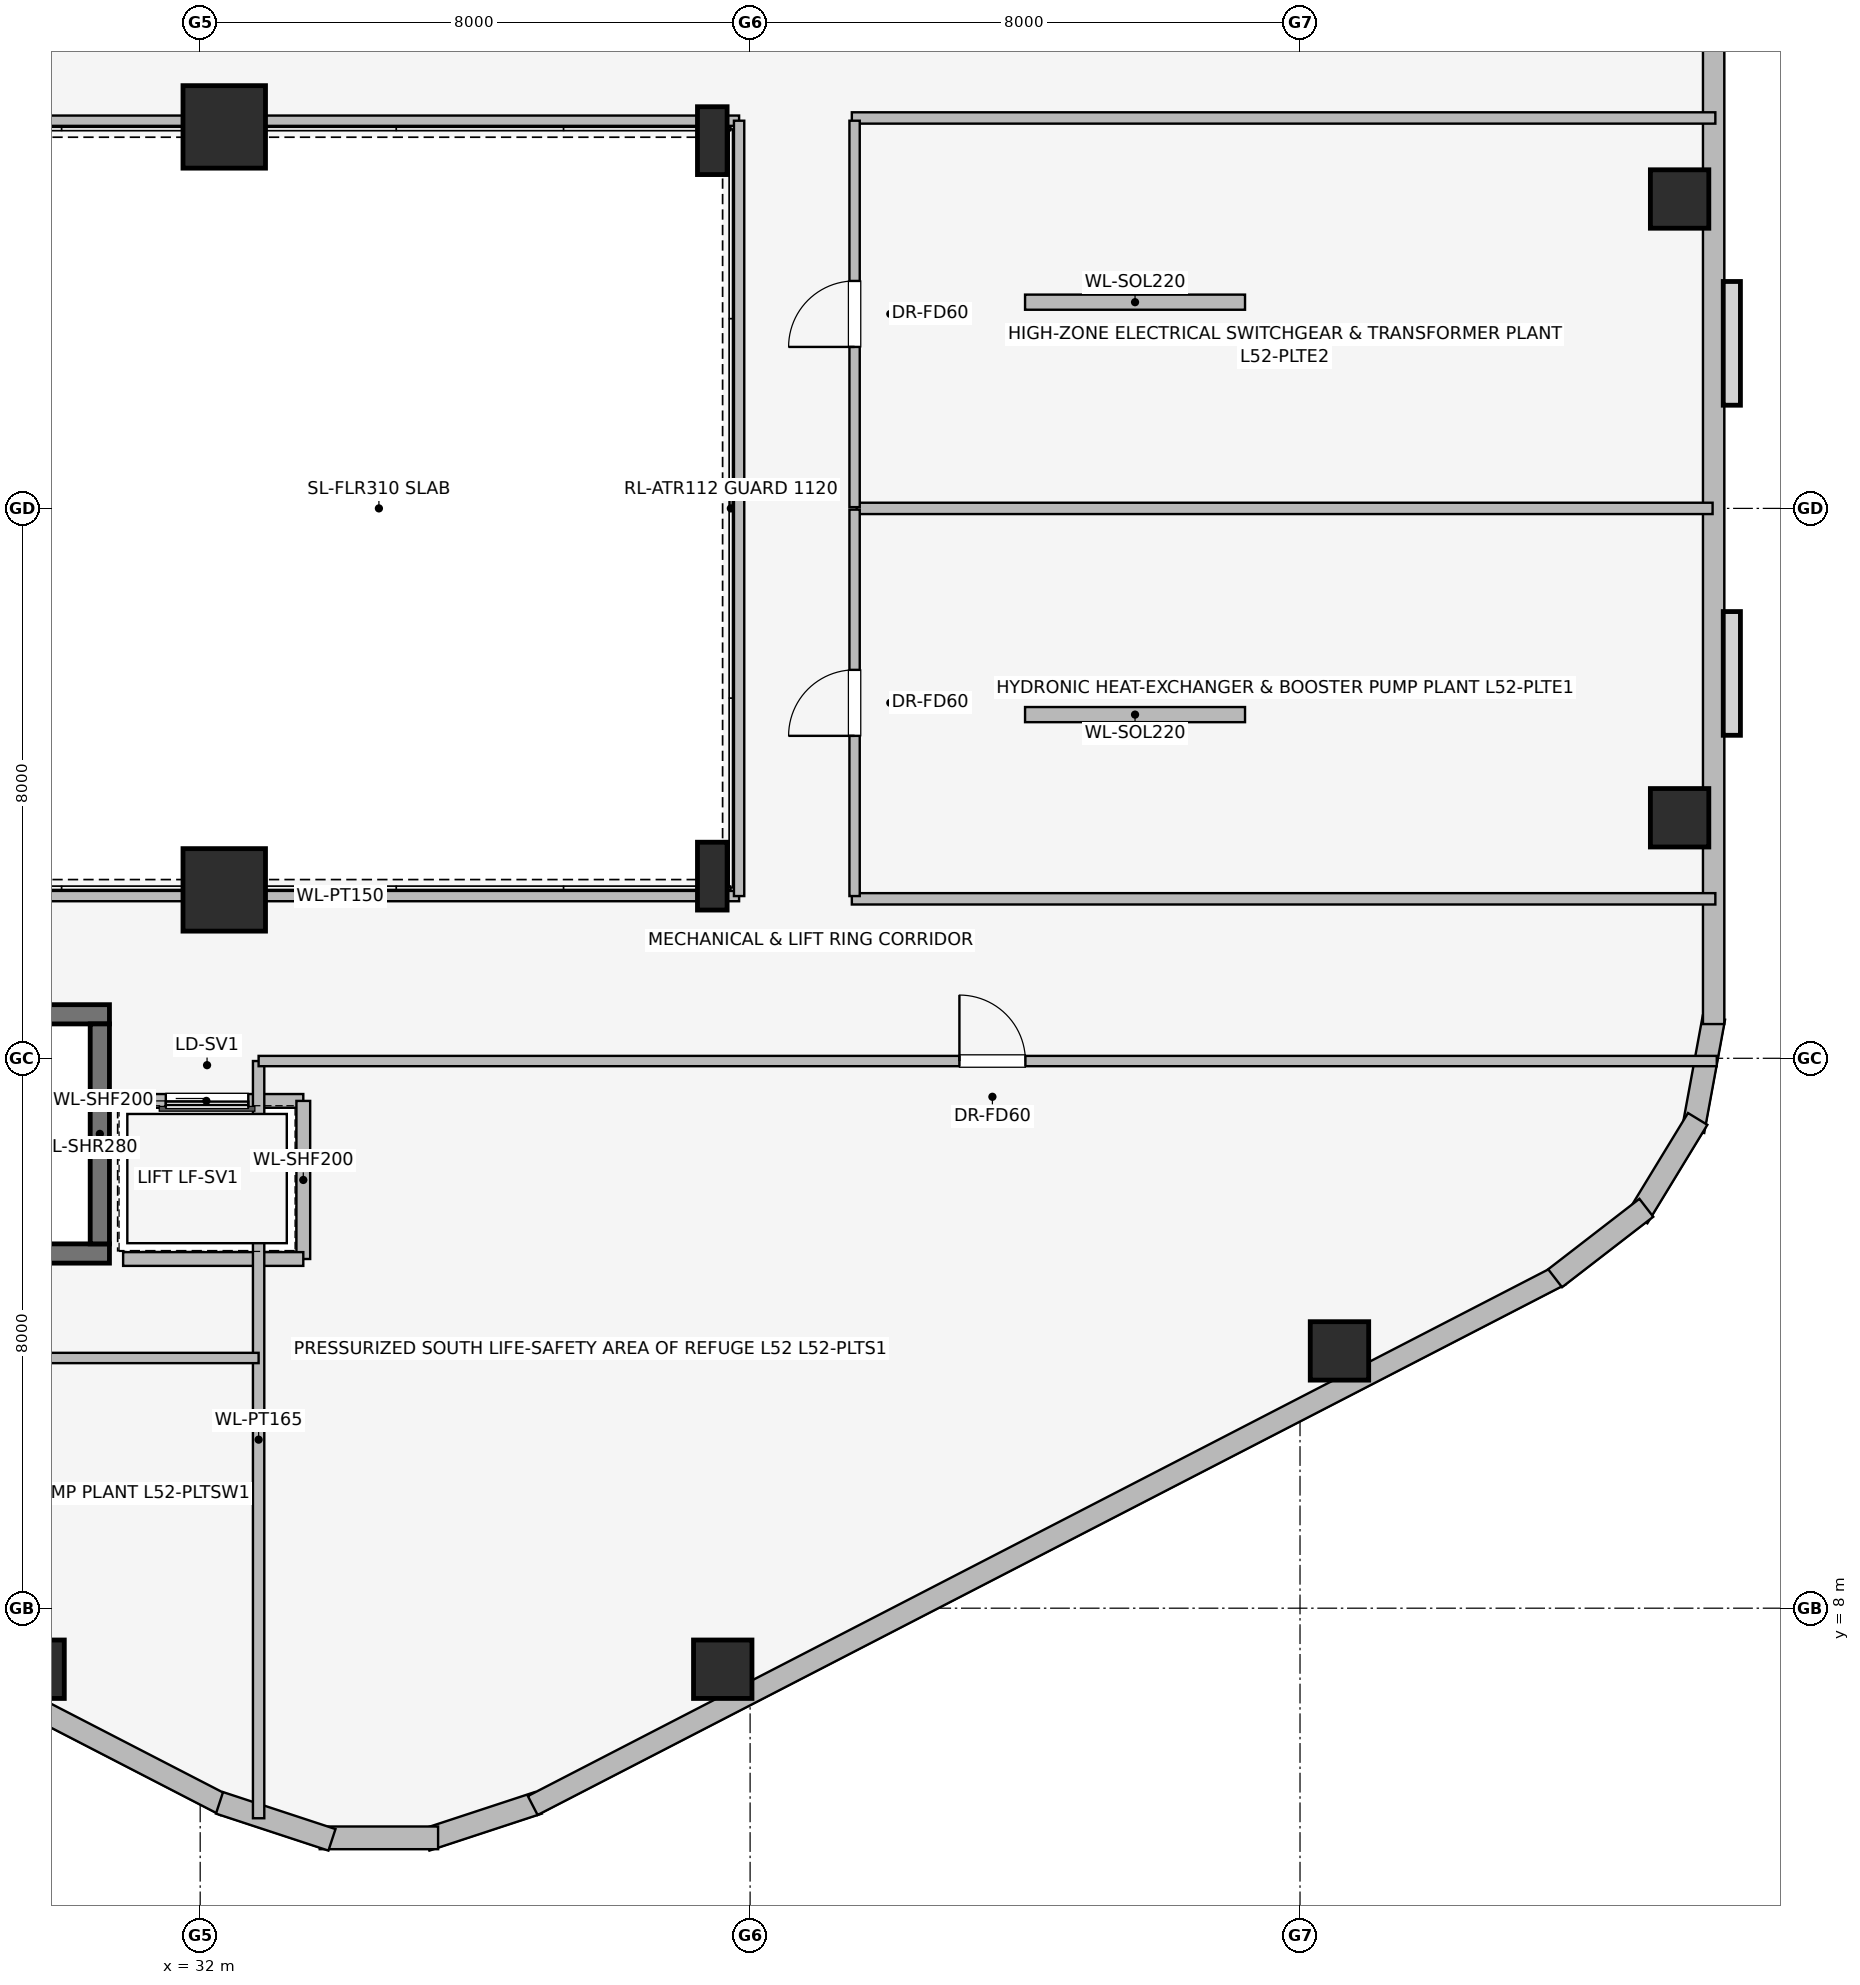
"""IFC4 building model, lengths in metres.
Left out: names, types, materials, properties, quantities, classifications, styles, units other than length and angle.
Written with IfcOpenShell. Run it as: python <this file> out.ifc"""

import sys

from ifc_helpers import new_model, si_unit, direction, frame, frame_2d, origin, origin_2d, place, context, subcontext, project, spatial, rectangle, i_section, extrude, element, fill, save


model = new_model("IFC4")
c1 = context("Model", 3, precision=1e-05, world=origin(), true_north=direction((0.0, 1.0)))
c2 = subcontext(c1, "Body", "Model", "MODEL_VIEW")
j1 = project(units=[si_unit("LENGTHUNIT", "METRE"), si_unit("PLANEANGLEUNIT", "RADIAN")], contexts=[c1])
p1 = place(None, origin())
s1 = spatial("IfcSite", under=j1, at=p1, CompositionType="ELEMENT")
p2 = place(p1, origin())
s2 = spatial("IfcBuilding", under=s1, at=p2, CompositionType="ELEMENT")
p3 = place(p2, frame((0.0, 0.0, 191.25)))
s3 = spatial("IfcBuildingStorey", under=s2, at=p3, CompositionType="ELEMENT", Elevation=191.25)
p4 = place(p3, frame((22.32, 13.16, 0.0), z_axis=(0.0, 0.0, 1.0), x_axis=(1.0, 0.0, 0.0)))
e1 = element("IfcWall", 1, at=p4, inside=s3, PredefinedType="SHEAR", context=c2, shape_type="SweptSolid", body=[
    extrude(rectangle(XDim=8.36, YDim=0.28, at=frame_2d((4.18, 0.0))), origin(), (0.0, 0.0, 1.0), 5.2),
])
p5 = place(p3, frame((30.68, 16.64, 0.0), z_axis=(0.0, 0.0, 1.0), x_axis=(-1.0, 0.0, 0.0)))
e2 = element("IfcWall", 2, at=p5, inside=s3, PredefinedType="SHEAR", context=c2, shape_type="SweptSolid", body=[
    extrude(rectangle(XDim=8.36, YDim=0.28, at=frame_2d((4.18, 0.0))), origin(), (0.0, 0.0, 1.0), 5.2),
])
p6 = place(p5, frame((6.08, 0.0, 0.0)))
e3 = element("IfcOpeningElement", 3, at=p6, cuts=e2, PredefinedType="OPENING", context=c2, shape_type="SweptSolid", body=[
    extrude(rectangle(XDim=1.05, YDim=2.0, at=frame_2d((0.525, 1.0))), frame((0.0, 0.15, 0.0), z_axis=(0.0, -1.0, 0.0), x_axis=(1.0, 0.0, 0.0)), (0.0, 0.0, 1.0), 0.3),
])
p7 = place(p3, frame((30.54, 13.3, 0.0), z_axis=(0.0, 0.0, 1.0), x_axis=(0.0, 1.0, 0.0)))
e4 = element("IfcWall", 4, at=p7, inside=s3, PredefinedType="SHEAR", context=c2, shape_type="SweptSolid", body=[
    extrude(rectangle(XDim=3.2, YDim=0.28, at=frame_2d((1.6, 0.0))), origin(), (0.0, 0.0, 1.0), 5.2),
])
for number, where, z_axis, x_axis in (
    (5, (32.35, 18.45, 0.0), (0.0, 0.0, 1.0), (1.0, 0.0, 0.0)),
    (6, (32.35, 29.55, 0.0), (0.0, 0.0, 1.0), (1.0, 0.0, 0.0)),
):
    element("IfcColumn", number, at=place(p3, frame(where, z_axis=z_axis, x_axis=x_axis)), inside=s3, PredefinedType="COLUMN", context=c2, shape_type="SweptSolid", body=[
        extrude(rectangle(XDim=1.2, YDim=1.2, at=origin_2d()), origin(), (0.0, 0.0, 1.0), 5.2),
    ])
for number, where, z_axis, x_axis in (
    (7, (29.598, 7.112, 0.0), (0.0, 0.0, 1.0), (1.0, 0.0, 0.0)),
    (8, (39.602, 7.112, 0.0), (0.0, 0.0, 1.0), (1.0, 0.0, 0.0)),
    (9, (48.574, 11.743, 0.0), (0.0, 0.0, 1.0), (1.0, 0.0, 0.0)),
    (10, (53.522, 19.499, 0.0), (0.0, 0.0, 1.0), (1.0, 0.0, 0.0)),
    (11, (53.522, 28.501, 0.0), (0.0, 0.0, 1.0), (1.0, 0.0, 0.0)),
):
    element("IfcColumn", number, at=place(p3, frame(where, z_axis=z_axis, x_axis=x_axis)), inside=s3, PredefinedType="COLUMN", context=c2, shape_type="SweptSolid", body=[
        extrude(rectangle(XDim=0.85, YDim=0.85, at=origin_2d()), origin(), (0.0, 0.0, 1.0), 5.2),
    ])
for number, where, z_axis, x_axis in (
    (12, (39.45, 18.65, 0.0), (0.0, 0.0, 1.0), (1.0, 0.0, 0.0)),
    (13, (39.45, 29.35, 0.0), (0.0, 0.0, 1.0), (1.0, 0.0, 0.0)),
):
    element("IfcColumn", number, at=place(p3, frame(where, z_axis=z_axis, x_axis=x_axis)), inside=s3, PredefinedType="COLUMN", context=c2, shape_type="SweptSolid", body=[
        extrude(i_section(OverallWidth=0.431, OverallDepth=0.987, WebThickness=0.034, FlangeThickness=0.062, at=origin_2d()), origin(), (0.0, 0.0, 1.0), 5.2),
    ])
p8 = place(p3, frame((32.362, 5.129, 0.0), z_axis=(0.0, 0.0, 1.0), x_axis=(-0.888626188278, 0.458632202867, 0.0)))
e14 = element("IfcWall", 14, at=p8, inside=s3, PredefinedType="STANDARD", context=c2, shape_type="SweptSolid", body=[
    extrude(rectangle(XDim=16.828, YDim=0.31, at=frame_2d((8.414, 0.0))), origin(), (0.0, 0.0, 1.0), 4.94),
])
p9 = place(p3, frame((36.919, 5.168, 0.0), z_axis=(0.0, 0.0, 1.0), x_axis=(-0.949937416267, -0.312440242569, 0.0)))
e15 = element("IfcWall", 15, at=p9, inside=s3, PredefinedType="STANDARD", context=c2, shape_type="SweptSolid", body=[
    extrude(rectangle(XDim=1.722, YDim=0.33, at=frame_2d((0.861, 0.0))), origin(), (0.0, 0.0, 1.0), 4.94),
])
p10 = place(p3, frame((35.461, 4.659, 0.0), z_axis=(0.0, 0.0, 1.0), x_axis=(-1.0, 0.0, 0.0)))
e16 = element("IfcWall", 16, at=p10, inside=s3, PredefinedType="STANDARD", context=c2, shape_type="SweptSolid", body=[
    extrude(rectangle(XDim=1.722, YDim=0.33, at=frame_2d((0.861, 0.0))), origin(), (0.0, 0.0, 1.0), 4.94),
])
p11 = place(p3, frame((33.917, 4.63, 0.0), z_axis=(0.0, 0.0, 1.0), x_axis=(-0.949937416267, 0.312440242569, 0.0)))
e17 = element("IfcWall", 17, at=p11, inside=s3, PredefinedType="STANDARD", context=c2, shape_type="SweptSolid", body=[
    extrude(rectangle(XDim=1.722, YDim=0.33, at=frame_2d((0.861, 0.0))), origin(), (0.0, 0.0, 1.0), 4.94),
])
p12 = place(p3, frame((51.792, 12.847, 0.0), z_axis=(0.0, 0.0, 1.0), x_axis=(-0.888626188278, -0.458632202867, 0.0)))
e18 = element("IfcWall", 18, at=p12, inside=s3, PredefinedType="STANDARD", context=c2, shape_type="SweptSolid", body=[
    extrude(rectangle(XDim=16.828, YDim=0.31, at=frame_2d((8.414, 0.0))), origin(), (0.0, 0.0, 1.0), 4.94),
])
p13 = place(p3, frame((54.021, 16.592, 0.0), z_axis=(0.0, 0.0, 1.0), x_axis=(-0.180717642671, -0.983535019014, 0.0)))
e19 = element("IfcWall", 19, at=p13, inside=s3, PredefinedType="STANDARD", context=c2, shape_type="SweptSolid", body=[
    extrude(rectangle(XDim=1.677, YDim=0.33, at=frame_2d((0.838, 0.0))), origin(), (0.0, 0.0, 1.0), 4.94),
])
p14 = place(p3, frame((53.785, 15.118, 0.0), z_axis=(0.0, 0.0, 1.0), x_axis=(-0.520219286058, -0.85403272444, 0.0)))
e20 = element("IfcWall", 20, at=p14, inside=s3, PredefinedType="STANDARD", context=c2, shape_type="SweptSolid", body=[
    extrude(rectangle(XDim=1.678, YDim=0.33, at=frame_2d((0.839, 0.0))), origin(), (0.0, 0.0, 1.0), 4.94),
])
p15 = place(p3, frame((53.038, 13.825, 0.0), z_axis=(0.0, 0.0, 1.0), x_axis=(-0.791464279355, -0.611215423976, 0.0)))
e21 = element("IfcWall", 21, at=p15, inside=s3, PredefinedType="STANDARD", context=c2, shape_type="SweptSolid", body=[
    extrude(rectangle(XDim=1.677, YDim=0.33, at=frame_2d((0.838, 0.0))), origin(), (0.0, 0.0, 1.0), 4.94),
])
p16 = place(p3, frame((54.017, 31.502, 0.0), z_axis=(0.0, 0.0, 1.0), x_axis=(0.0, -1.0, 0.0)))
e22 = element("IfcWall", 22, at=p16, inside=s3, PredefinedType="STANDARD", context=c2, shape_type="SweptSolid", body=[
    extrude(rectangle(XDim=15.004, YDim=0.31, at=frame_2d((7.502, 0.0))), origin(), (0.0, 0.0, 1.0), 4.94),
])
for number, where, z_axis, x_axis in (
    (23, (44.0, 21.0, 0.0), (0.0, 0.0, 1.0), (1.0, 0.0, 0.0)),
    (24, (44.0, 27.0, 0.0), (0.0, 0.0, 1.0), (1.0, 0.0, 0.0)),
):
    element("IfcWall", number, at=place(p3, frame(where, z_axis=z_axis, x_axis=x_axis)), inside=s3, PredefinedType="SOLIDWALL", context=c2, shape_type="SweptSolid", body=[
        extrude(rectangle(XDim=3.2, YDim=0.22, at=frame_2d((1.6, 0.0))), origin(), (0.0, 0.0, 1.0), 2.8),
    ])
p17 = place(p3, frame((33.5, 15.38, 0.0), z_axis=(0.0, 0.0, 1.0), x_axis=(-1.0, 0.0, 0.0)))
e25 = element("IfcWall", 25, at=p17, inside=s3, PredefinedType="PARTITIONING", context=c2, shape_type="SweptSolid", body=[
    extrude(rectangle(XDim=2.82, YDim=0.2, at=frame_2d((1.41, 0.0))), origin(), (0.0, 0.0, 1.0), 4.94),
])
p18 = place(p17, frame((0.8, 0.0, 0.0)))
e26 = element("IfcOpeningElement", 26, at=p18, cuts=e25, PredefinedType="OPENING", context=c2, shape_type="SweptSolid", body=[
    extrude(rectangle(XDim=1.2, YDim=2.2, at=frame_2d((0.6, 1.1))), frame((0.0, 0.11, 0.0), z_axis=(0.0, -1.0, 0.0), x_axis=(1.0, 0.0, 0.0)), (0.0, 0.0, 1.0), 0.22),
])
p19 = place(p3, frame((33.5, 13.08, 0.0), z_axis=(0.0, 0.0, 1.0), x_axis=(0.0, 1.0, 0.0)))
e27 = element("IfcWall", 27, at=p19, inside=s3, PredefinedType="PARTITIONING", context=c2, shape_type="SweptSolid", body=[
    extrude(rectangle(XDim=2.3, YDim=0.2, at=frame_2d((1.15, 0.0))), origin(), (0.0, 0.0, 1.0), 4.94),
])
p20 = place(p3, frame((30.879, 13.08, 0.0), z_axis=(0.0, 0.0, 1.0), x_axis=(1.0, 0.0, 0.0)))
e28 = element("IfcWall", 28, at=p20, inside=s3, PredefinedType="PARTITIONING", context=c2, shape_type="SweptSolid", body=[
    extrude(rectangle(XDim=2.621, YDim=0.2, at=frame_2d((1.311, 0.0))), origin(), (0.0, 0.0, 1.0), 4.94),
])
p21 = place(p3, frame((27.675, 18.36, 0.0), z_axis=(0.0, 0.0, 1.0), x_axis=(1.0, 0.0, 0.0)))
e29 = element("IfcWall", 29, at=p21, inside=s3, PredefinedType="PARTITIONING", context=c2, shape_type="SweptSolid", body=[
    extrude(rectangle(XDim=12.165, YDim=0.15, at=frame_2d((6.083, 0.0))), origin(), (0.0, 0.0, 1.0), 4.081),
])
p22 = place(p3, frame((39.84, 29.64, 0.0), z_axis=(0.0, 0.0, 1.0), x_axis=(-1.0, 0.0, 0.0)))
e30 = element("IfcWall", 30, at=p22, inside=s3, PredefinedType="PARTITIONING", context=c2, shape_type="SweptSolid", body=[
    extrude(rectangle(XDim=12.2, YDim=0.15, at=frame_2d((6.1, 0.0))), origin(), (0.0, 0.0, 1.0), 4.081),
])
p23 = place(p3, frame((39.84, 18.36, 0.0), z_axis=(0.0, 0.0, 1.0), x_axis=(0.0, 1.0, 0.0)))
e31 = element("IfcWall", 31, at=p23, inside=s3, PredefinedType="PARTITIONING", context=c2, shape_type="SweptSolid", body=[
    extrude(rectangle(XDim=11.28, YDim=0.15, at=frame_2d((5.64, 0.0))), origin(), (0.0, 0.0, 1.0), 4.94),
])
p24 = place(p3, frame((32.85, 4.944, 0.0), z_axis=(0.0, 0.0, 1.0), x_axis=(0.0, 1.0, 0.0)))
e32 = element("IfcWall", 32, at=p24, inside=s3, PredefinedType="PARTITIONING", context=c2, shape_type="SweptSolid", body=[
    extrude(rectangle(XDim=11.016, YDim=0.165, at=frame_2d((5.508, 0.0))), origin(), (0.0, 0.0, 1.0), 4.94),
])
p25 = place(p3, frame((32.85, 11.64, 0.0), z_axis=(0.0, 0.0, 1.0), x_axis=(-1.0, 0.0, 0.0)))
e33 = element("IfcWall", 33, at=p25, inside=s3, PredefinedType="PARTITIONING", context=c2, shape_type="SweptSolid", body=[
    extrude(rectangle(XDim=11.6, YDim=0.15, at=frame_2d((5.8, 0.0))), origin(), (0.0, 0.0, 1.0), 4.94),
])
p26 = place(p25, frame((5.32, 0.0, 0.0)))
e34 = element("IfcOpeningElement", 34, at=p26, cuts=e33, PredefinedType="OPENING", context=c2, shape_type="SweptSolid", body=[
    extrude(rectangle(XDim=0.96, YDim=2.0, at=frame_2d((0.48, 1.0))), frame((0.0, 0.085, 0.0), z_axis=(0.0, -1.0, 0.0), x_axis=(1.0, 0.0, 0.0)), (0.0, 0.0, 1.0), 0.17),
])
for number, where, z_axis, x_axis in (
    (35, (41.48, 18.32, 0.0), (0.0, 0.0, 1.0), (1.0, 0.0, 0.0)),
    (36, (41.48, 29.68, 0.0), (0.0, 0.0, 1.0), (1.0, 0.0, 0.0)),
):
    element("IfcWall", number, at=place(p3, frame(where, z_axis=z_axis, x_axis=x_axis)), inside=s3, PredefinedType="PARTITIONING", context=c2, shape_type="SweptSolid", body=[
        extrude(rectangle(XDim=12.562, YDim=0.165, at=frame_2d((6.281, 0.0))), origin(), (0.0, 0.0, 1.0), 4.94),
    ])
p27 = place(p3, frame((41.55, 24.0, 0.0), z_axis=(0.0, 0.0, 1.0), x_axis=(1.0, 0.0, 0.0)))
e37 = element("IfcWall", 37, at=p27, inside=s3, PredefinedType="PARTITIONING", context=c2, shape_type="SweptSolid", body=[
    extrude(rectangle(XDim=12.452, YDim=0.165, at=frame_2d((6.226, 0.0))), origin(), (0.0, 0.0, 1.0), 4.94),
])
p28 = place(p3, frame((41.52, 18.36, 0.0), z_axis=(0.0, 0.0, 1.0), x_axis=(0.0, 1.0, 0.0)))
e38 = element("IfcWall", 38, at=p28, inside=s3, PredefinedType="PARTITIONING", context=c2, shape_type="SweptSolid", body=[
    extrude(rectangle(XDim=5.622, YDim=0.15, at=frame_2d((2.811, 0.0))), origin(), (0.0, 0.0, 1.0), 4.94),
])
p29 = place(p28, frame((2.331, 0.0, 0.0)))
e39 = element("IfcOpeningElement", 39, at=p29, cuts=e38, PredefinedType="OPENING", context=c2, shape_type="SweptSolid", body=[
    extrude(rectangle(XDim=0.96, YDim=2.0, at=frame_2d((0.48, 1.0))), frame((0.0, 0.085, 0.0), z_axis=(0.0, -1.0, 0.0), x_axis=(1.0, 0.0, 0.0)), (0.0, 0.0, 1.0), 0.17),
])
p30 = place(p3, frame((41.52, 24.018, 0.0), z_axis=(0.0, 0.0, 1.0), x_axis=(0.0, 1.0, 0.0)))
e40 = element("IfcWall", 40, at=p30, inside=s3, PredefinedType="PARTITIONING", context=c2, shape_type="SweptSolid", body=[
    extrude(rectangle(XDim=5.622, YDim=0.15, at=frame_2d((2.811, 0.0))), origin(), (0.0, 0.0, 1.0), 4.94),
])
p31 = place(p30, frame((2.331, 0.0, 0.0)))
e41 = element("IfcOpeningElement", 41, at=p31, cuts=e40, PredefinedType="OPENING", context=c2, shape_type="SweptSolid", body=[
    extrude(rectangle(XDim=0.96, YDim=2.0, at=frame_2d((0.48, 1.0))), frame((0.0, 0.085, 0.0), z_axis=(0.0, -1.0, 0.0), x_axis=(1.0, 0.0, 0.0)), (0.0, 0.0, 1.0), 0.17),
])
p32 = place(p3, frame((32.85, 15.96, 0.0), z_axis=(0.0, 0.0, 1.0), x_axis=(1.0, 0.0, 0.0)))
e42 = element("IfcWall", 42, at=p32, inside=s3, PredefinedType="PARTITIONING", context=c2, shape_type="SweptSolid", body=[
    extrude(rectangle(XDim=21.213, YDim=0.15, at=frame_2d((10.606, 0.0))), origin(), (0.0, 0.0, 1.0), 4.94),
])
p33 = place(p32, frame((10.195, 0.0, 0.0)))
e43 = element("IfcOpeningElement", 43, at=p33, cuts=e42, PredefinedType="OPENING", context=c2, shape_type="SweptSolid", body=[
    extrude(rectangle(XDim=0.96, YDim=2.0, at=frame_2d((0.48, 1.0))), frame((0.0, 0.085, 0.0), z_axis=(0.0, -1.0, 0.0), x_axis=(1.0, 0.0, 0.0)), (0.0, 0.0, 1.0), 0.17),
])
p34 = place(p18, origin())
e44 = element("IfcDoor", 44, at=p34, inside=s3, OperationType="SLIDING_TO_RIGHT", PredefinedType="DOOR", context=c2, shape_type="SweptSolid", body=[
    extrude(rectangle(XDim=1.2, YDim=2.2, at=frame_2d((0.6, 1.1))), frame((0.0, 0.025, 0.0), z_axis=(0.0, -1.0, 0.0), x_axis=(1.0, 0.0, 0.0)), (0.0, 0.0, 1.0), 0.05),
])
fill(e26, e44)
p35 = place(p29, origin())
e45 = element("IfcDoor", 45, at=p35, inside=s3, OperationType="SINGLE_SWING_LEFT", PredefinedType="DOOR", context=c2, shape_type="SweptSolid", body=[
    extrude(rectangle(XDim=0.96, YDim=2.0, at=frame_2d((0.48, 1.0))), frame((0.0, 0.025, 0.0), z_axis=(0.0, -1.0, 0.0), x_axis=(1.0, 0.0, 0.0)), (0.0, 0.0, 1.0), 0.05),
])
fill(e39, e45)
p36 = place(p31, origin())
e46 = element("IfcDoor", 46, at=p36, inside=s3, OperationType="SINGLE_SWING_LEFT", PredefinedType="DOOR", context=c2, shape_type="SweptSolid", body=[
    extrude(rectangle(XDim=0.96, YDim=2.0, at=frame_2d((0.48, 1.0))), frame((0.0, 0.025, 0.0), z_axis=(0.0, -1.0, 0.0), x_axis=(1.0, 0.0, 0.0)), (0.0, 0.0, 1.0), 0.05),
])
fill(e41, e46)
p37 = place(p33, origin())
e47 = element("IfcDoor", 47, at=p37, inside=s3, OperationType="SINGLE_SWING_LEFT", PredefinedType="DOOR", context=c2, shape_type="SweptSolid", body=[
    extrude(rectangle(XDim=0.96, YDim=2.0, at=frame_2d((0.48, 1.0))), frame((0.0, 0.025, 0.0), z_axis=(0.0, -1.0, 0.0), x_axis=(1.0, 0.0, 0.0)), (0.0, 0.0, 1.0), 0.05),
])
fill(e43, e47)
save(model, sys.argv[1])
